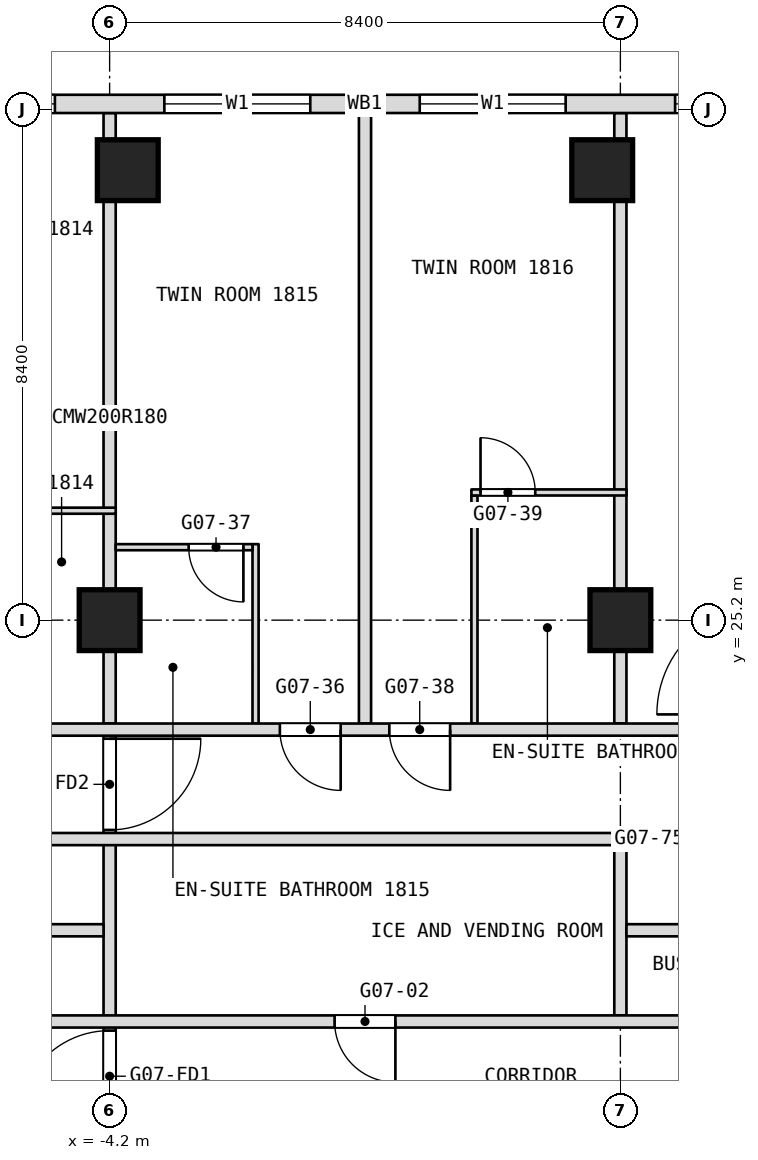
"""IFC4 building model, lengths in metres.
Left out: names, types, materials, properties, quantities, classifications, styles, units other than length and angle.
Written with IfcOpenShell. Run it as: python <this file> out.ifc"""

import sys

from ifc_helpers import new_model, si_unit, direction, frame, frame_2d, origin, origin_2d, place, context, subcontext, project, spatial, rectangle, extrude, element, fill, save


model = new_model("IFC4")
c1 = context("Model", 3, precision=1e-05, world=origin(), true_north=direction((0.0, 1.0)))
c2 = subcontext(c1, "Body", "Model", "MODEL_VIEW")
j1 = project(units=[si_unit("LENGTHUNIT", "METRE"), si_unit("PLANEANGLEUNIT", "RADIAN")], contexts=[c1])
p1 = place(None, origin())
s1 = spatial("IfcSite", under=j1, at=p1, CompositionType="ELEMENT")
p2 = place(p1, origin())
s2 = spatial("IfcBuilding", under=s1, at=p2, CompositionType="ELEMENT")
p3 = place(p2, frame((0.0, 0.0, 79.7)))
s3 = spatial("IfcBuildingStorey", under=s2, at=p3, CompositionType="ELEMENT", Elevation=79.7)
for number, where, z_axis, x_axis in (
    (1, (-4.2, 25.2, 0.0), (0.0, 0.0, 1.0), (1.0, 0.0, 0.0)),
    (2, (4.2, 25.2, 0.0), (0.0, 0.0, 1.0), (1.0, 0.0, 0.0)),
    (3, (-3.901, 32.6, 0.0), (0.0, 0.0, 1.0), (1.0, 0.0, 0.0)),
    (4, (3.901, 32.6, 0.0), (0.0, 0.0, 1.0), (1.0, 0.0, 0.0)),
):
    element("IfcColumn", number, at=place(p3, frame(where, z_axis=z_axis, x_axis=x_axis)), inside=s3, PredefinedType="COLUMN", context=c2, shape_type="SweptSolid", body=[
        extrude(rectangle(XDim=1.0, YDim=1.0, at=origin_2d()), origin(), (0.0, 0.0, 1.0), 3.6),
    ])
p4 = place(p3, frame((4.2, 18.7, 0.0), z_axis=(0.0, 0.0, 1.0), x_axis=(0.0, 1.0, 0.0)))
e5 = element("IfcWall", 5, at=p4, inside=s3, PredefinedType="PARTITIONING", context=c2, shape_type="SweptSolid", body=[
    extrude(rectangle(XDim=2.8, YDim=0.2, at=frame_2d((1.4, 0.0))), origin(), (0.0, 0.0, 1.0), 3.34),
])
p5 = place(p3, frame((4.2, 23.5, 0.0), z_axis=(0.0, 0.0, 1.0), x_axis=(0.0, 1.0, 0.0)))
e6 = element("IfcWall", 6, at=p5, inside=s3, PredefinedType="PARTITIONING", context=c2, shape_type="SweptSolid", body=[
    extrude(rectangle(XDim=10.04, YDim=0.2, at=frame_2d((5.02, 0.0))), origin(), (0.0, 0.0, 1.0), 3.34),
])
p6 = place(p3, frame((1.8, 23.5, 0.0), z_axis=(0.0, 0.0, 1.0), x_axis=(0.0, 1.0, 0.0)))
e7 = element("IfcWall", 7, at=p6, inside=s3, PredefinedType="PARTITIONING", context=c2, shape_type="SweptSolid", body=[
    extrude(rectangle(XDim=3.75, YDim=0.1, at=frame_2d((1.875, 0.0))), origin(), (0.0, 0.0, 1.0), 3.34),
])
p7 = place(p3, frame((0.0, 23.5, 0.0), z_axis=(0.0, 0.0, 1.0), x_axis=(0.0, 1.0, 0.0)))
e8 = element("IfcWall", 8, at=p7, inside=s3, PredefinedType="PARTITIONING", context=c2, shape_type="SweptSolid", body=[
    extrude(rectangle(XDim=10.04, YDim=0.2, at=frame_2d((5.02, 0.0))), origin(), (0.0, 0.0, 1.0), 3.34),
])
p8 = place(p3, frame((-1.8, 23.5, 0.0), z_axis=(0.0, 0.0, 1.0), x_axis=(0.0, 1.0, 0.0)))
e9 = element("IfcWall", 9, at=p8, inside=s3, PredefinedType="PARTITIONING", context=c2, shape_type="SweptSolid", body=[
    extrude(rectangle(XDim=2.95, YDim=0.1, at=frame_2d((1.475, 0.0))), origin(), (0.0, 0.0, 1.0), 3.34),
])
p9 = place(p3, frame((-4.2, 16.8, 0.0), z_axis=(0.0, 0.0, 1.0), x_axis=(0.0, 1.0, 0.0)))
e10 = element("IfcWall", 10, at=p9, inside=s3, PredefinedType="PARTITIONING", context=c2, shape_type="SweptSolid", body=[
    extrude(rectangle(XDim=6.7, YDim=0.2, at=frame_2d((3.35, 0.0))), origin(), (0.0, 0.0, 1.0), 3.34),
])
p10 = place(p9, frame((0.15, 0.0, 0.0)))
e11 = element("IfcOpeningElement", 11, at=p10, cuts=e10, PredefinedType="OPENING", context=c2, shape_type="SweptSolid", body=[
    extrude(rectangle(XDim=1.5, YDim=2.1, at=frame_2d((0.75, 1.05))), frame((0.0, 0.1, 0.0), z_axis=(0.0, -1.0, 0.0), x_axis=(1.0, 0.0, 0.0)), (0.0, 0.0, 1.0), 0.2),
])
p11 = place(p9, frame((4.95, 0.0, 0.0)))
e12 = element("IfcOpeningElement", 12, at=p11, cuts=e10, PredefinedType="OPENING", context=c2, shape_type="SweptSolid", body=[
    extrude(rectangle(XDim=1.5, YDim=2.1, at=frame_2d((0.75, 1.05))), frame((0.0, 0.1, 0.0), z_axis=(0.0, -1.0, 0.0), x_axis=(1.0, 0.0, 0.0)), (0.0, 0.0, 1.0), 0.2),
])
p12 = place(p3, frame((-4.2, 23.5, 0.0), z_axis=(0.0, 0.0, 1.0), x_axis=(0.0, 1.0, 0.0)))
e13 = element("IfcWall", 13, at=p12, inside=s3, PredefinedType="PARTITIONING", context=c2, shape_type="SweptSolid", body=[
    extrude(rectangle(XDim=10.04, YDim=0.2, at=frame_2d((5.02, 0.0))), origin(), (0.0, 0.0, 1.0), 3.34),
])
p13 = place(p3, frame((-16.9, 18.6, 0.0), z_axis=(0.0, 0.0, 1.0), x_axis=(1.0, 0.0, 0.0)))
e14 = element("IfcWall", 14, at=p13, inside=s3, PredefinedType="PARTITIONING", context=c2, shape_type="SweptSolid", body=[
    extrude(rectangle(XDim=25.1, YDim=0.2, at=frame_2d((12.55, 0.0))), origin(), (0.0, 0.0, 1.0), 3.34),
])
p14 = place(p13, frame((1.7, 0.0, 0.0)))
e15 = element("IfcOpeningElement", 15, at=p14, cuts=e14, PredefinedType="OPENING", context=c2, shape_type="SweptSolid", body=[
    extrude(rectangle(XDim=1.0, YDim=2.1, at=frame_2d((0.5, 1.05))), frame((0.0, 0.1, 0.0), z_axis=(0.0, -1.0, 0.0), x_axis=(1.0, 0.0, 0.0)), (0.0, 0.0, 1.0), 0.2),
])
p15 = place(p13, frame((16.4, 0.0, 0.0)))
e16 = element("IfcOpeningElement", 16, at=p15, cuts=e14, PredefinedType="OPENING", context=c2, shape_type="SweptSolid", body=[
    extrude(rectangle(XDim=1.0, YDim=2.1, at=frame_2d((0.5, 1.05))), frame((0.0, 0.1, 0.0), z_axis=(0.0, -1.0, 0.0), x_axis=(1.0, 0.0, 0.0)), (0.0, 0.0, 1.0), 0.2),
])
p16 = place(p13, frame((8.0, 0.0, 0.0)))
e17 = element("IfcOpeningElement", 17, at=p16, cuts=e14, PredefinedType="OPENING", context=c2, shape_type="SweptSolid", body=[
    extrude(rectangle(XDim=1.0, YDim=2.1, at=frame_2d((0.5, 1.05))), frame((0.0, 0.1, 0.0), z_axis=(0.0, -1.0, 0.0), x_axis=(1.0, 0.0, 0.0)), (0.0, 0.0, 1.0), 0.2),
])
p17 = place(p13, frame((22.55, 0.0, 0.0)))
e18 = element("IfcOpeningElement", 18, at=p17, cuts=e14, PredefinedType="OPENING", context=c2, shape_type="SweptSolid", body=[
    extrude(rectangle(XDim=1.0, YDim=2.1, at=frame_2d((0.5, 1.05))), frame((0.0, 0.1, 0.0), z_axis=(0.0, -1.0, 0.0), x_axis=(1.0, 0.0, 0.0)), (0.0, 0.0, 1.0), 0.2),
])
p18 = place(p3, frame((-12.5, 20.1, 0.0), z_axis=(0.0, 0.0, 1.0), x_axis=(1.0, 0.0, 0.0)))
e19 = element("IfcWall", 19, at=p18, inside=s3, PredefinedType="PARTITIONING", context=c2, shape_type="SweptSolid", body=[
    extrude(rectangle(XDim=8.2, YDim=0.2, at=frame_2d((4.1, 0.0))), origin(), (0.0, 0.0, 1.0), 3.34),
])
p19 = place(p3, frame((4.3, 20.1, 0.0), z_axis=(0.0, 0.0, 1.0), x_axis=(1.0, 0.0, 0.0)))
e20 = element("IfcWall", 20, at=p19, inside=s3, PredefinedType="PARTITIONING", context=c2, shape_type="SweptSolid", body=[
    extrude(rectangle(XDim=3.7, YDim=0.2, at=frame_2d((1.85, 0.0))), origin(), (0.0, 0.0, 1.0), 3.34),
])
p20 = place(p3, frame((-16.7, 21.6, 0.0), z_axis=(0.0, 0.0, 1.0), x_axis=(1.0, 0.0, 0.0)))
e21 = element("IfcWall", 21, at=p20, inside=s3, PredefinedType="PARTITIONING", context=c2, shape_type="SweptSolid", body=[
    extrude(rectangle(XDim=24.7, YDim=0.2, at=frame_2d((12.35, 0.0))), origin(), (0.0, 0.0, 1.0), 3.34),
])
p21 = place(p20, frame((7.8, 0.0, 0.0)))
e22 = element("IfcOpeningElement", 22, at=p21, cuts=e21, PredefinedType="OPENING", context=c2, shape_type="SweptSolid", body=[
    extrude(rectangle(XDim=1.0, YDim=2.1, at=frame_2d((0.5, 1.05))), frame((0.0, 0.1, 0.0), z_axis=(0.0, -1.0, 0.0), x_axis=(1.0, 0.0, 0.0)), (0.0, 0.0, 1.0), 0.2),
])
p22 = place(p20, frame((22.25, 0.0, 0.0)))
e23 = element("IfcOpeningElement", 23, at=p22, cuts=e21, PredefinedType="OPENING", context=c2, shape_type="SweptSolid", body=[
    extrude(rectangle(XDim=1.0, YDim=2.1, at=frame_2d((0.5, 1.05))), frame((0.0, 0.1, 0.0), z_axis=(0.0, -1.0, 0.0), x_axis=(1.0, 0.0, 0.0)), (0.0, 0.0, 1.0), 0.2),
])
p23 = place(p3, frame((-16.7, 23.4, 0.0), z_axis=(0.0, 0.0, 1.0), x_axis=(1.0, 0.0, 0.0)))
e24 = element("IfcWall", 24, at=p23, inside=s3, PredefinedType="PARTITIONING", context=c2, shape_type="SweptSolid", body=[
    extrude(rectangle(XDim=23.4, YDim=0.2, at=frame_2d((11.7, 0.0))), origin(), (0.0, 0.0, 1.0), 3.34),
])
p24 = place(p23, frame((2.4, 0.0, 0.0)))
e25 = element("IfcOpeningElement", 25, at=p24, cuts=e24, PredefinedType="OPENING", context=c2, shape_type="SweptSolid", body=[
    extrude(rectangle(XDim=0.9, YDim=2.1, at=frame_2d((0.45, 1.05))), frame((0.0, 0.1, 0.0), z_axis=(0.0, -1.0, 0.0), x_axis=(1.0, 0.0, 0.0)), (0.0, 0.0, 1.0), 0.2),
])
p25 = place(p23, frame((5.65, 0.0, 0.0)))
e26 = element("IfcOpeningElement", 26, at=p25, cuts=e24, PredefinedType="OPENING", context=c2, shape_type="SweptSolid", body=[
    extrude(rectangle(XDim=1.1, YDim=2.1, at=frame_2d((0.55, 1.05))), frame((0.0, 0.1, 0.0), z_axis=(0.0, -1.0, 0.0), x_axis=(1.0, 0.0, 0.0)), (0.0, 0.0, 1.0), 0.2),
])
p26 = place(p23, frame((15.3, 0.0, 0.0)))
e27 = element("IfcOpeningElement", 27, at=p26, cuts=e24, PredefinedType="OPENING", context=c2, shape_type="SweptSolid", body=[
    extrude(rectangle(XDim=1.0, YDim=2.1, at=frame_2d((0.5, 1.05))), frame((0.0, 0.1, 0.0), z_axis=(0.0, -1.0, 0.0), x_axis=(1.0, 0.0, 0.0)), (0.0, 0.0, 1.0), 0.2),
])
p27 = place(p23, frame((17.1, 0.0, 0.0)))
e28 = element("IfcOpeningElement", 28, at=p27, cuts=e24, PredefinedType="OPENING", context=c2, shape_type="SweptSolid", body=[
    extrude(rectangle(XDim=1.0, YDim=2.1, at=frame_2d((0.5, 1.05))), frame((0.0, 0.1, 0.0), z_axis=(0.0, -1.0, 0.0), x_axis=(1.0, 0.0, 0.0)), (0.0, 0.0, 1.0), 0.2),
])
p28 = place(p3, frame((-4.1, 26.4, 0.0), z_axis=(0.0, 0.0, 1.0), x_axis=(1.0, 0.0, 0.0)))
e29 = element("IfcWall", 29, at=p28, inside=s3, PredefinedType="PARTITIONING", context=c2, shape_type="SweptSolid", body=[
    extrude(rectangle(XDim=2.25, YDim=0.1, at=frame_2d((1.125, 0.0))), origin(), (0.0, 0.0, 1.0), 3.34),
])
p29 = place(p28, frame((1.2, 0.0, 0.0)))
e30 = element("IfcOpeningElement", 30, at=p29, cuts=e29, PredefinedType="OPENING", context=c2, shape_type="SweptSolid", body=[
    extrude(rectangle(XDim=0.9, YDim=2.1, at=frame_2d((0.45, 1.05))), frame((0.0, 0.05, 0.0), z_axis=(0.0, -1.0, 0.0), x_axis=(1.0, 0.0, 0.0)), (0.0, 0.0, 1.0), 0.1),
])
p30 = place(p3, frame((-6.65, 27.0, 0.0), z_axis=(0.0, 0.0, 1.0), x_axis=(1.0, 0.0, 0.0)))
e31 = element("IfcWall", 31, at=p30, inside=s3, PredefinedType="PARTITIONING", context=c2, shape_type="SweptSolid", body=[
    extrude(rectangle(XDim=2.55, YDim=0.1, at=frame_2d((1.275, 0.0))), origin(), (0.0, 0.0, 1.0), 3.34),
])
p31 = place(p3, frame((1.75, 27.3, 0.0), z_axis=(0.0, 0.0, 1.0), x_axis=(1.0, 0.0, 0.0)))
e32 = element("IfcWall", 32, at=p31, inside=s3, PredefinedType="PARTITIONING", context=c2, shape_type="SweptSolid", body=[
    extrude(rectangle(XDim=2.55, YDim=0.1, at=frame_2d((1.275, 0.0))), origin(), (0.0, 0.0, 1.0), 3.34),
])
p32 = place(p31, frame((0.15, 0.0, 0.0)))
e33 = element("IfcOpeningElement", 33, at=p32, cuts=e32, PredefinedType="OPENING", context=c2, shape_type="SweptSolid", body=[
    extrude(rectangle(XDim=0.9, YDim=2.1, at=frame_2d((0.45, 1.05))), frame((0.0, 0.05, 0.0), z_axis=(0.0, -1.0, 0.0), x_axis=(1.0, 0.0, 0.0)), (0.0, 0.0, 1.0), 0.1),
])
p33 = place(p3, frame((23.406, 33.69, 0.0), z_axis=(0.0, 0.0, 1.0), x_axis=(-1.0, 0.0, 0.0)))
e34 = element("IfcWall", 34, at=p33, inside=s3, PredefinedType="NOTDEFINED", context=c2, shape_type="SweptSolid", body=[
    extrude(rectangle(XDim=46.812, YDim=0.3, at=frame_2d((23.406, 0.0))), origin(), (0.0, 0.0, 1.0), 3.6),
])
p34 = place(p33, frame((2.186, 0.0, 0.9)))
e35 = element("IfcOpeningElement", 35, at=p34, cuts=e34, PredefinedType="OPENING", context=c2, shape_type="SweptSolid", body=[
    extrude(rectangle(XDim=2.4, YDim=2.1, at=frame_2d((1.2, 1.05))), frame((0.0, 0.15, 0.0), z_axis=(0.0, -1.0, 0.0), x_axis=(1.0, 0.0, 0.0)), (0.0, 0.0, 1.0), 0.3),
])
p35 = place(p33, frame((7.506, 0.0, 0.9)))
e36 = element("IfcOpeningElement", 36, at=p35, cuts=e34, PredefinedType="OPENING", context=c2, shape_type="SweptSolid", body=[
    extrude(rectangle(XDim=2.4, YDim=2.1, at=frame_2d((1.2, 1.05))), frame((0.0, 0.15, 0.0), z_axis=(0.0, -1.0, 0.0), x_axis=(1.0, 0.0, 0.0)), (0.0, 0.0, 1.0), 0.3),
])
p36 = place(p33, frame((11.706, 0.0, 0.9)))
e37 = element("IfcOpeningElement", 37, at=p36, cuts=e34, PredefinedType="OPENING", context=c2, shape_type="SweptSolid", body=[
    extrude(rectangle(XDim=2.4, YDim=2.1, at=frame_2d((1.2, 1.05))), frame((0.0, 0.15, 0.0), z_axis=(0.0, -1.0, 0.0), x_axis=(1.0, 0.0, 0.0)), (0.0, 0.0, 1.0), 0.3),
])
p37 = place(p33, frame((15.906, 0.0, 0.9)))
e38 = element("IfcOpeningElement", 38, at=p37, cuts=e34, PredefinedType="OPENING", context=c2, shape_type="SweptSolid", body=[
    extrude(rectangle(XDim=2.4, YDim=2.1, at=frame_2d((1.2, 1.05))), frame((0.0, 0.15, 0.0), z_axis=(0.0, -1.0, 0.0), x_axis=(1.0, 0.0, 0.0)), (0.0, 0.0, 1.0), 0.3),
])
p38 = place(p33, frame((20.106, 0.0, 0.9)))
e39 = element("IfcOpeningElement", 39, at=p38, cuts=e34, PredefinedType="OPENING", context=c2, shape_type="SweptSolid", body=[
    extrude(rectangle(XDim=2.4, YDim=2.1, at=frame_2d((1.2, 1.05))), frame((0.0, 0.15, 0.0), z_axis=(0.0, -1.0, 0.0), x_axis=(1.0, 0.0, 0.0)), (0.0, 0.0, 1.0), 0.3),
])
p39 = place(p33, frame((24.306, 0.0, 0.9)))
e40 = element("IfcOpeningElement", 40, at=p39, cuts=e34, PredefinedType="OPENING", context=c2, shape_type="SweptSolid", body=[
    extrude(rectangle(XDim=2.4, YDim=2.1, at=frame_2d((1.2, 1.05))), frame((0.0, 0.15, 0.0), z_axis=(0.0, -1.0, 0.0), x_axis=(1.0, 0.0, 0.0)), (0.0, 0.0, 1.0), 0.3),
])
p40 = place(p33, frame((28.506, 0.0, 0.9)))
e41 = element("IfcOpeningElement", 41, at=p40, cuts=e34, PredefinedType="OPENING", context=c2, shape_type="SweptSolid", body=[
    extrude(rectangle(XDim=2.4, YDim=2.1, at=frame_2d((1.2, 1.05))), frame((0.0, 0.15, 0.0), z_axis=(0.0, -1.0, 0.0), x_axis=(1.0, 0.0, 0.0)), (0.0, 0.0, 1.0), 0.3),
])
p41 = place(p33, frame((32.706, 0.0, 0.9)))
e42 = element("IfcOpeningElement", 42, at=p41, cuts=e34, PredefinedType="OPENING", context=c2, shape_type="SweptSolid", body=[
    extrude(rectangle(XDim=2.4, YDim=2.1, at=frame_2d((1.2, 1.05))), frame((0.0, 0.15, 0.0), z_axis=(0.0, -1.0, 0.0), x_axis=(1.0, 0.0, 0.0)), (0.0, 0.0, 1.0), 0.3),
])
p42 = place(p33, frame((36.906, 0.0, 0.9)))
e43 = element("IfcOpeningElement", 43, at=p42, cuts=e34, PredefinedType="OPENING", context=c2, shape_type="SweptSolid", body=[
    extrude(rectangle(XDim=2.4, YDim=2.1, at=frame_2d((1.2, 1.05))), frame((0.0, 0.15, 0.0), z_axis=(0.0, -1.0, 0.0), x_axis=(1.0, 0.0, 0.0)), (0.0, 0.0, 1.0), 0.3),
])
p43 = place(p33, frame((42.226, 0.0, 0.9)))
e44 = element("IfcOpeningElement", 44, at=p43, cuts=e34, PredefinedType="OPENING", context=c2, shape_type="SweptSolid", body=[
    extrude(rectangle(XDim=2.4, YDim=2.1, at=frame_2d((1.2, 1.05))), frame((0.0, 0.15, 0.0), z_axis=(0.0, -1.0, 0.0), x_axis=(1.0, 0.0, 0.0)), (0.0, 0.0, 1.0), 0.3),
])
p44 = place(p15, origin())
e45 = element("IfcDoor", 45, at=p44, inside=s3, OperationType="SINGLE_SWING_LEFT", PredefinedType="DOOR", context=c2, shape_type="SweptSolid", body=[
    extrude(rectangle(XDim=1.0, YDim=2.1, at=frame_2d((0.5, 1.05))), frame((0.0, 0.025, 0.0), z_axis=(0.0, -1.0, 0.0), x_axis=(1.0, 0.0, 0.0)), (0.0, 0.0, 1.0), 0.05),
])
fill(e16, e45)
p45 = place(p26, origin())
e46 = element("IfcDoor", 46, at=p45, inside=s3, OperationType="SINGLE_SWING_LEFT", PredefinedType="DOOR", context=c2, shape_type="SweptSolid", body=[
    extrude(rectangle(XDim=1.0, YDim=2.1, at=frame_2d((0.5, 1.05))), frame((0.0, 0.025, 0.0), z_axis=(0.0, -1.0, 0.0), x_axis=(1.0, 0.0, 0.0)), (0.0, 0.0, 1.0), 0.05),
])
fill(e27, e46)
p46 = place(p27, origin())
e47 = element("IfcDoor", 47, at=p46, inside=s3, OperationType="SINGLE_SWING_LEFT", PredefinedType="DOOR", context=c2, shape_type="SweptSolid", body=[
    extrude(rectangle(XDim=1.0, YDim=2.1, at=frame_2d((0.5, 1.05))), frame((0.0, 0.025, 0.0), z_axis=(0.0, -1.0, 0.0), x_axis=(1.0, 0.0, 0.0)), (0.0, 0.0, 1.0), 0.05),
])
fill(e28, e47)
p47 = place(p29, origin())
e48 = element("IfcDoor", 48, at=p47, inside=s3, OperationType="SINGLE_SWING_LEFT", PredefinedType="DOOR", context=c2, shape_type="SweptSolid", body=[
    extrude(rectangle(XDim=0.9, YDim=2.1, at=frame_2d((0.45, 1.05))), frame((0.0, 0.025, 0.0), z_axis=(0.0, -1.0, 0.0), x_axis=(1.0, 0.0, 0.0)), (0.0, 0.0, 1.0), 0.05),
])
fill(e30, e48)
p48 = place(p32, origin())
e49 = element("IfcDoor", 49, at=p48, inside=s3, OperationType="SINGLE_SWING_RIGHT", PredefinedType="DOOR", context=c2, shape_type="SweptSolid", body=[
    extrude(rectangle(XDim=0.9, YDim=2.1, at=frame_2d((0.45, 1.05))), frame((0.0, 0.025, 0.0), z_axis=(0.0, -1.0, 0.0), x_axis=(1.0, 0.0, 0.0)), (0.0, 0.0, 1.0), 0.05),
])
fill(e33, e49)
p49 = place(p37, origin())
e50 = element("IfcWindow", 50, at=p49, inside=s3, PartitioningType="SINGLE_PANEL", PredefinedType="WINDOW", context=c2, shape_type="SweptSolid", body=[
    extrude(rectangle(XDim=2.4, YDim=2.1, at=frame_2d((1.2, 1.05))), frame((0.0, 0.03, 0.0), z_axis=(0.0, -1.0, 0.0), x_axis=(1.0, 0.0, 0.0)), (0.0, 0.0, 1.0), 0.06),
])
fill(e38, e50)
p50 = place(p38, origin())
e51 = element("IfcWindow", 51, at=p50, inside=s3, PartitioningType="SINGLE_PANEL", PredefinedType="WINDOW", context=c2, shape_type="SweptSolid", body=[
    extrude(rectangle(XDim=2.4, YDim=2.1, at=frame_2d((1.2, 1.05))), frame((0.0, 0.03, 0.0), z_axis=(0.0, -1.0, 0.0), x_axis=(1.0, 0.0, 0.0)), (0.0, 0.0, 1.0), 0.06),
])
fill(e39, e51)
p51 = place(p39, origin())
e52 = element("IfcWindow", 52, at=p51, inside=s3, PartitioningType="SINGLE_PANEL", PredefinedType="WINDOW", context=c2, shape_type="SweptSolid", body=[
    extrude(rectangle(XDim=2.4, YDim=2.1, at=frame_2d((1.2, 1.05))), frame((0.0, 0.03, 0.0), z_axis=(0.0, -1.0, 0.0), x_axis=(1.0, 0.0, 0.0)), (0.0, 0.0, 1.0), 0.06),
])
fill(e40, e52)
p52 = place(p40, origin())
e53 = element("IfcWindow", 53, at=p52, inside=s3, PartitioningType="SINGLE_PANEL", PredefinedType="WINDOW", context=c2, shape_type="SweptSolid", body=[
    extrude(rectangle(XDim=2.4, YDim=2.1, at=frame_2d((1.2, 1.05))), frame((0.0, 0.03, 0.0), z_axis=(0.0, -1.0, 0.0), x_axis=(1.0, 0.0, 0.0)), (0.0, 0.0, 1.0), 0.06),
])
fill(e41, e53)
p53 = place(p10, origin())
e54 = element("IfcDoor", 54, at=p53, inside=s3, OperationType="DOUBLE_DOOR_DOUBLE_SWING", PredefinedType="DOOR", context=c2, shape_type="SweptSolid", body=[
    extrude(rectangle(XDim=1.5, YDim=2.1, at=frame_2d((0.75, 1.05))), frame((0.0, 0.025, 0.0), z_axis=(0.0, -1.0, 0.0), x_axis=(1.0, 0.0, 0.0)), (0.0, 0.0, 1.0), 0.05),
])
fill(e11, e54)
p54 = place(p11, origin())
e55 = element("IfcDoor", 55, at=p54, inside=s3, OperationType="DOUBLE_DOOR_DOUBLE_SWING", PredefinedType="DOOR", context=c2, shape_type="SweptSolid", body=[
    extrude(rectangle(XDim=1.5, YDim=2.1, at=frame_2d((0.75, 1.05))), frame((0.0, 0.025, 0.0), z_axis=(0.0, -1.0, 0.0), x_axis=(1.0, 0.0, 0.0)), (0.0, 0.0, 1.0), 0.05),
])
fill(e12, e55)
save(model, sys.argv[1])
